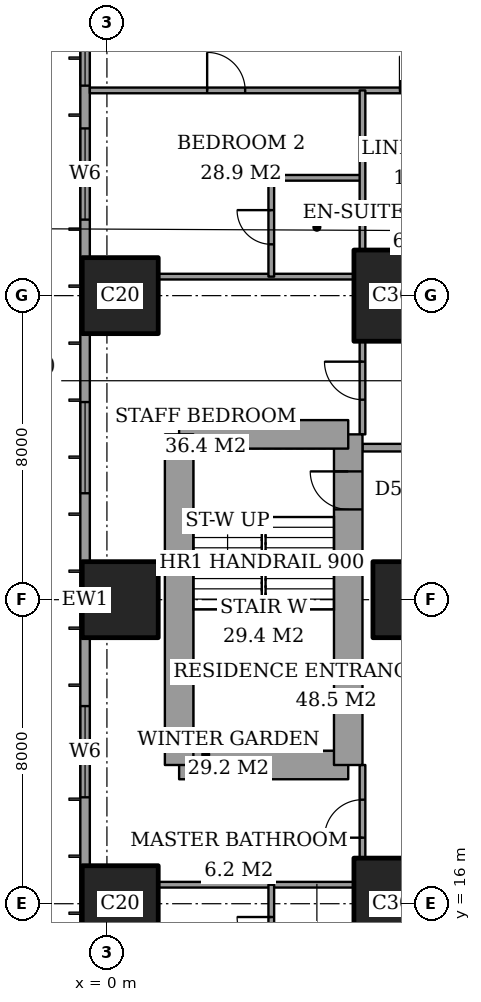
"""IFC4 building model, lengths in metres.
Left out: names, types, materials, properties, quantities, classifications, styles, units other than length and angle.
Written with IfcOpenShell. Run it as: python <this file> out.ifc"""

import sys

from ifc_helpers import new_model, si_unit, direction, frame, frame_2d, origin, origin_2d, place, context, subcontext, project, spatial, rectangle, extrude, element, fill, save


model = new_model("IFC4")
c1 = context("Model", 3, precision=1e-05, world=origin(), true_north=direction((0.0, 1.0)))
c2 = subcontext(c1, "Body", "Model", "MODEL_VIEW")
j1 = project(units=[si_unit("LENGTHUNIT", "METRE"), si_unit("PLANEANGLEUNIT", "RADIAN")], contexts=[c1])
p1 = place(None, origin())
s1 = spatial("IfcSite", under=j1, at=p1, CompositionType="ELEMENT")
p2 = place(p1, origin())
s2 = spatial("IfcBuilding", under=s1, at=p2, CompositionType="ELEMENT")
p3 = place(p2, frame((0.0, 0.0, 47.6)))
s3 = spatial("IfcBuildingStorey", under=s2, at=p3, CompositionType="ELEMENT", Elevation=47.6)
for number, where, z_axis, x_axis in (
    (1, (0.35, 16.0, 0.0), (0.0, 0.0, 1.0), (1.0, 0.0, 0.0)),
    (2, (0.35, 24.0, 0.0), (0.0, 0.0, 1.0), (1.0, 0.0, 0.0)),
    (3, (0.35, 32.0, 0.0), (0.0, 0.0, 1.0), (1.0, 0.0, 0.0)),
):
    element("IfcColumn", number, at=place(p3, frame(where, z_axis=z_axis, x_axis=x_axis)), inside=s3, PredefinedType="COLUMN", context=c2, shape_type="SweptSolid", body=[
        extrude(rectangle(XDim=2.0, YDim=2.0, at=origin_2d()), origin(), (0.0, 0.0, 1.0), 3.6),
    ])
p4 = place(p3, frame((8.0, 16.0, 0.0), z_axis=(0.0, 0.0, 1.0), x_axis=(1.0, 0.0, 0.0)))
e4 = element("IfcColumn", 4, at=p4, inside=s3, PredefinedType="COLUMN", context=c2, shape_type="SweptSolid", body=[
    extrude(rectangle(XDim=3.0, YDim=2.4, at=origin_2d()), origin(), (0.0, 0.0, 1.0), 3.6),
])
p5 = place(p3, frame((8.0, 24.0, 0.0), z_axis=(0.0, 0.0, 1.0), x_axis=(1.0, 0.0, 0.0)))
e5 = element("IfcColumn", 5, at=p5, inside=s3, PredefinedType="COLUMN", context=c2, shape_type="SweptSolid", body=[
    extrude(rectangle(XDim=2.0, YDim=2.0, at=origin_2d()), origin(), (0.0, 0.0, 1.0), 3.6),
])
p6 = place(p3, frame((8.0, 32.0, 0.0), z_axis=(0.0, 0.0, 1.0), x_axis=(1.0, 0.0, 0.0)))
e6 = element("IfcColumn", 6, at=p6, inside=s3, PredefinedType="COLUMN", context=c2, shape_type="SweptSolid", body=[
    extrude(rectangle(XDim=3.0, YDim=2.4, at=origin_2d()), origin(), (0.0, 0.0, 1.0), 3.6),
])
p7 = place(p3, frame((1.9, 19.65, 0.0), z_axis=(0.0, 0.0, 1.0), x_axis=(1.0, 0.0, 0.0)))
e7 = element("IfcWall", 7, at=p7, inside=s3, PredefinedType="SHEAR", context=c2, shape_type="SweptSolid", body=[
    extrude(rectangle(XDim=4.45, YDim=0.75, at=frame_2d((2.225, 0.0))), origin(), (0.0, 0.0, 1.0), 3.6),
])
p8 = place(p3, frame((6.35, 19.65, 0.0), z_axis=(0.0, 0.0, 1.0), x_axis=(0.0, 1.0, 0.0)))
e8 = element("IfcWall", 8, at=p8, inside=s3, PredefinedType="SHEAR", context=c2, shape_type="SweptSolid", body=[
    extrude(rectangle(XDim=8.7, YDim=0.75, at=frame_2d((4.35, 0.0))), origin(), (0.0, 0.0, 1.0), 3.6),
])
p9 = place(p8, frame((6.725, 0.0, 0.0)))
e9 = element("IfcOpeningElement", 9, at=p9, cuts=e8, PredefinedType="OPENING", context=c2, shape_type="SweptSolid", body=[
    extrude(rectangle(XDim=1.0, YDim=2.1, at=frame_2d((0.5, 1.05))), frame((0.0, 0.385, 0.0), z_axis=(0.0, -1.0, 0.0), x_axis=(1.0, 0.0, 0.0)), (0.0, 0.0, 1.0), 0.77),
])
p10 = place(p3, frame((6.35, 28.35, 0.0), z_axis=(0.0, 0.0, 1.0), x_axis=(-1.0, 0.0, 0.0)))
e10 = element("IfcWall", 10, at=p10, inside=s3, PredefinedType="SHEAR", context=c2, shape_type="SweptSolid", body=[
    extrude(rectangle(XDim=4.45, YDim=0.75, at=frame_2d((2.225, 0.0))), origin(), (0.0, 0.0, 1.0), 3.6),
])
p11 = place(p3, frame((1.9, 28.35, 0.0), z_axis=(0.0, 0.0, 1.0), x_axis=(0.0, -1.0, 0.0)))
e11 = element("IfcWall", 11, at=p11, inside=s3, PredefinedType="SHEAR", context=c2, shape_type="SweptSolid", body=[
    extrude(rectangle(XDim=8.7, YDim=0.75, at=frame_2d((4.35, 0.0))), origin(), (0.0, 0.0, 1.0), 3.6),
])
p12 = place(p3, frame((-0.575, 44.825, 0.0), z_axis=(0.0, 0.0, 1.0), x_axis=(0.0, -1.0, 0.0)))
e12 = element("IfcWall", 12, at=p12, inside=s3, PredefinedType="SOLIDWALL", context=c2, shape_type="SweptSolid", body=[
    extrude(rectangle(XDim=41.65, YDim=0.25, at=frame_2d((20.825, 0.0))), origin(), (0.0, 0.0, 1.0), 3.6),
])
p13 = place(p12, frame((0.775, 0.0, 0.6)))
e13 = element("IfcOpeningElement", 13, at=p13, cuts=e12, PredefinedType="OPENING", context=c2, shape_type="SweptSolid", body=[
    extrude(rectangle(XDim=2.4, YDim=2.0, at=frame_2d((1.2, 1.0))), frame((0.0, 0.135, 0.0), z_axis=(0.0, -1.0, 0.0), x_axis=(1.0, 0.0, 0.0)), (0.0, 0.0, 1.0), 0.27),
])
p14 = place(p12, frame((6.1, 0.0, 0.6)))
e14 = element("IfcOpeningElement", 14, at=p14, cuts=e12, PredefinedType="OPENING", context=c2, shape_type="SweptSolid", body=[
    extrude(rectangle(XDim=1.2, YDim=2.0, at=frame_2d((0.6, 1.0))), frame((0.0, 0.135, 0.0), z_axis=(0.0, -1.0, 0.0), x_axis=(1.0, 0.0, 0.0)), (0.0, 0.0, 1.0), 0.27),
])
p15 = place(p12, frame((8.425, 0.0, 0.6)))
e15 = element("IfcOpeningElement", 15, at=p15, cuts=e12, PredefinedType="OPENING", context=c2, shape_type="SweptSolid", body=[
    extrude(rectangle(XDim=2.4, YDim=2.0, at=frame_2d((1.2, 1.0))), frame((0.0, 0.135, 0.0), z_axis=(0.0, -1.0, 0.0), x_axis=(1.0, 0.0, 0.0)), (0.0, 0.0, 1.0), 0.27),
])
p16 = place(p12, frame((15.625, 0.0, 0.6)))
e16 = element("IfcOpeningElement", 16, at=p16, cuts=e12, PredefinedType="OPENING", context=c2, shape_type="SweptSolid", body=[
    extrude(rectangle(XDim=2.4, YDim=2.0, at=frame_2d((1.2, 1.0))), frame((0.0, 0.135, 0.0), z_axis=(0.0, -1.0, 0.0), x_axis=(1.0, 0.0, 0.0)), (0.0, 0.0, 1.0), 0.27),
])
p17 = place(p12, frame((23.625, 0.0, 0.6)))
e17 = element("IfcOpeningElement", 17, at=p17, cuts=e12, PredefinedType="OPENING", context=c2, shape_type="SweptSolid", body=[
    extrude(rectangle(XDim=2.4, YDim=2.0, at=frame_2d((1.2, 1.0))), frame((0.0, 0.135, 0.0), z_axis=(0.0, -1.0, 0.0), x_axis=(1.0, 0.0, 0.0)), (0.0, 0.0, 1.0), 0.27),
])
p18 = place(p12, frame((30.825, 0.0, 0.6)))
e18 = element("IfcOpeningElement", 18, at=p18, cuts=e12, PredefinedType="OPENING", context=c2, shape_type="SweptSolid", body=[
    extrude(rectangle(XDim=2.4, YDim=2.0, at=frame_2d((1.2, 1.0))), frame((0.0, 0.135, 0.0), z_axis=(0.0, -1.0, 0.0), x_axis=(1.0, 0.0, 0.0)), (0.0, 0.0, 1.0), 0.27),
])
p19 = place(p12, frame((34.5, 0.0, 0.6)))
e19 = element("IfcOpeningElement", 19, at=p19, cuts=e12, PredefinedType="OPENING", context=c2, shape_type="SweptSolid", body=[
    extrude(rectangle(XDim=1.2, YDim=2.0, at=frame_2d((0.6, 1.0))), frame((0.0, 0.135, 0.0), z_axis=(0.0, -1.0, 0.0), x_axis=(1.0, 0.0, 0.0)), (0.0, 0.0, 1.0), 0.27),
])
p20 = place(p12, frame((38.475, 0.0, 0.6)))
e20 = element("IfcOpeningElement", 20, at=p20, cuts=e12, PredefinedType="OPENING", context=c2, shape_type="SweptSolid", body=[
    extrude(rectangle(XDim=2.4, YDim=2.0, at=frame_2d((1.2, 1.0))), frame((0.0, 0.135, 0.0), z_axis=(0.0, -1.0, 0.0), x_axis=(1.0, 0.0, 0.0)), (0.0, 0.0, 1.0), 0.27),
])
p21 = place(p3, frame((1.35, 16.5, 0.0), z_axis=(0.0, 0.0, 1.0), x_axis=(1.0, 0.0, 0.0)))
e21 = element("IfcWall", 21, at=p21, inside=s3, PredefinedType="PARTITIONING", context=c2, shape_type="SweptSolid", body=[
    extrude(rectangle(XDim=5.15, YDim=0.15, at=frame_2d((2.575, 0.0))), origin(), (0.0, 0.0, 1.0), 3.35),
])
p22 = place(p3, frame((6.725, 28.0, 0.0), z_axis=(0.0, 0.0, 1.0), x_axis=(1.0, 0.0, 0.0)))
e22 = element("IfcWall", 22, at=p22, inside=s3, PredefinedType="PARTITIONING", context=c2, shape_type="SweptSolid", body=[
    extrude(rectangle(XDim=17.275, YDim=0.2, at=frame_2d((8.637, 0.0))), origin(), (0.0, 0.0, 1.0), 3.35),
])
p23 = place(p22, frame((6.475, 0.0, 0.0)))
e23 = element("IfcOpeningElement", 23, at=p23, cuts=e22, PredefinedType="OPENING", context=c2, shape_type="SweptSolid", body=[
    extrude(rectangle(XDim=1.2, YDim=2.4, at=frame_2d((0.6, 1.2))), frame((0.0, 0.11, 0.0), z_axis=(0.0, -1.0, 0.0), x_axis=(1.0, 0.0, 0.0)), (0.0, 0.0, 1.0), 0.22),
])
p24 = place(p3, frame((1.35, 32.5, 0.0), z_axis=(0.0, 0.0, 1.0), x_axis=(1.0, 0.0, 0.0)))
e24 = element("IfcWall", 24, at=p24, inside=s3, PredefinedType="PARTITIONING", context=c2, shape_type="SweptSolid", body=[
    extrude(rectangle(XDim=5.15, YDim=0.15, at=frame_2d((2.575, 0.0))), origin(), (0.0, 0.0, 1.0), 3.35),
])
p25 = place(p3, frame((4.325, 35.1, 0.0), z_axis=(0.0, 0.0, 1.0), x_axis=(1.0, 0.0, 0.0)))
e25 = element("IfcWall", 25, at=p25, inside=s3, PredefinedType="PARTITIONING", context=c2, shape_type="SweptSolid", body=[
    extrude(rectangle(XDim=2.4, YDim=0.15, at=frame_2d((1.2, 0.0))), origin(), (0.0, 0.0, 1.0), 3.35),
])
p26 = place(p3, frame((-0.45, 37.4, 0.0), z_axis=(0.0, 0.0, 1.0), x_axis=(1.0, 0.0, 0.0)))
e26 = element("IfcWall", 26, at=p26, inside=s3, PredefinedType="PARTITIONING", context=c2, shape_type="SweptSolid", body=[
    extrude(rectangle(XDim=25.011, YDim=0.15, at=frame_2d((12.505, 0.0))), origin(), (0.0, 0.0, 1.0), 3.35),
])
p27 = place(p26, frame((10.65, 0.0, 0.0)))
e27 = element("IfcOpeningElement", 27, at=p27, cuts=e26, PredefinedType="OPENING", context=c2, shape_type="SweptSolid", body=[
    extrude(rectangle(XDim=1.0, YDim=2.1, at=frame_2d((0.5, 1.05))), frame((0.0, 0.085, 0.0), z_axis=(0.0, -1.0, 0.0), x_axis=(1.0, 0.0, 0.0)), (0.0, 0.0, 1.0), 0.17),
])
p28 = place(p26, frame((3.087, 0.0, 0.0)))
e28 = element("IfcOpeningElement", 28, at=p28, cuts=e26, PredefinedType="OPENING", context=c2, shape_type="SweptSolid", body=[
    extrude(rectangle(XDim=1.0, YDim=2.1, at=frame_2d((0.5, 1.05))), frame((0.0, 0.085, 0.0), z_axis=(0.0, -1.0, 0.0), x_axis=(1.0, 0.0, 0.0)), (0.0, 0.0, 1.0), 0.17),
])
p29 = place(p26, frame((8.163, 0.0, 0.0)))
e29 = element("IfcOpeningElement", 29, at=p29, cuts=e26, PredefinedType="OPENING", context=c2, shape_type="SweptSolid", body=[
    extrude(rectangle(XDim=0.9, YDim=2.1, at=frame_2d((0.45, 1.05))), frame((0.0, 0.085, 0.0), z_axis=(0.0, -1.0, 0.0), x_axis=(1.0, 0.0, 0.0)), (0.0, 0.0, 1.0), 0.17),
])
p30 = place(p26, frame((13.35, 0.0, 0.0)))
e30 = element("IfcOpeningElement", 30, at=p30, cuts=e26, PredefinedType="OPENING", context=c2, shape_type="SweptSolid", body=[
    extrude(rectangle(XDim=1.0, YDim=2.1, at=frame_2d((0.5, 1.05))), frame((0.0, 0.085, 0.0), z_axis=(0.0, -1.0, 0.0), x_axis=(1.0, 0.0, 0.0)), (0.0, 0.0, 1.0), 0.17),
])
p31 = place(p26, frame((16.45, 0.0, 0.0)))
e31 = element("IfcOpeningElement", 31, at=p31, cuts=e26, PredefinedType="OPENING", context=c2, shape_type="SweptSolid", body=[
    extrude(rectangle(XDim=1.0, YDim=2.1, at=frame_2d((0.5, 1.05))), frame((0.0, 0.085, 0.0), z_axis=(0.0, -1.0, 0.0), x_axis=(1.0, 0.0, 0.0)), (0.0, 0.0, 1.0), 0.17),
])
p32 = place(p26, frame((21.175, 0.0, 0.0)))
e32 = element("IfcOpeningElement", 32, at=p32, cuts=e26, PredefinedType="OPENING", context=c2, shape_type="SweptSolid", body=[
    extrude(rectangle(XDim=1.0, YDim=2.1, at=frame_2d((0.5, 1.05))), frame((0.0, 0.085, 0.0), z_axis=(0.0, -1.0, 0.0), x_axis=(1.0, 0.0, 0.0)), (0.0, 0.0, 1.0), 0.17),
])
p33 = place(p3, frame((4.325, 13.9, 0.0), z_axis=(0.0, 0.0, 1.0), x_axis=(0.0, 1.0, 0.0)))
e33 = element("IfcWall", 33, at=p33, inside=s3, PredefinedType="PARTITIONING", context=c2, shape_type="SweptSolid", body=[
    extrude(rectangle(XDim=2.6, YDim=0.15, at=frame_2d((1.3, 0.0))), origin(), (0.0, 0.0, 1.0), 3.35),
])
p34 = place(p33, frame((0.85, 0.0, 0.0)))
e34 = element("IfcOpeningElement", 34, at=p34, cuts=e33, PredefinedType="OPENING", context=c2, shape_type="SweptSolid", body=[
    extrude(rectangle(XDim=0.9, YDim=2.1, at=frame_2d((0.45, 1.05))), frame((0.0, 0.085, 0.0), z_axis=(0.0, -1.0, 0.0), x_axis=(1.0, 0.0, 0.0)), (0.0, 0.0, 1.0), 0.17),
])
p35 = place(p3, frame((4.325, 32.5, 0.0), z_axis=(0.0, 0.0, 1.0), x_axis=(0.0, 1.0, 0.0)))
e35 = element("IfcWall", 35, at=p35, inside=s3, PredefinedType="PARTITIONING", context=c2, shape_type="SweptSolid", body=[
    extrude(rectangle(XDim=2.6, YDim=0.15, at=frame_2d((1.3, 0.0))), origin(), (0.0, 0.0, 1.0), 3.35),
])
p36 = place(p35, frame((0.85, 0.0, 0.0)))
e36 = element("IfcOpeningElement", 36, at=p36, cuts=e35, PredefinedType="OPENING", context=c2, shape_type="SweptSolid", body=[
    extrude(rectangle(XDim=0.9, YDim=2.1, at=frame_2d((0.45, 1.05))), frame((0.0, 0.085, 0.0), z_axis=(0.0, -1.0, 0.0), x_axis=(1.0, 0.0, 0.0)), (0.0, 0.0, 1.0), 0.17),
])
p37 = place(p3, frame((6.725, 17.2, 0.0), z_axis=(0.0, 0.0, 1.0), x_axis=(0.0, 1.0, 0.0)))
e37 = element("IfcWall", 37, at=p37, inside=s3, PredefinedType="PARTITIONING", context=c2, shape_type="SweptSolid", body=[
    extrude(rectangle(XDim=2.45, YDim=0.15, at=frame_2d((1.225, 0.0))), origin(), (0.0, 0.0, 1.0), 3.35),
])
p38 = place(p37, frame((0.538, 0.0, 0.0)))
e38 = element("IfcOpeningElement", 38, at=p38, cuts=e37, PredefinedType="OPENING", context=c2, shape_type="SweptSolid", body=[
    extrude(rectangle(XDim=1.0, YDim=2.1, at=frame_2d((0.5, 1.05))), frame((0.0, 0.085, 0.0), z_axis=(0.0, -1.0, 0.0), x_axis=(1.0, 0.0, 0.0)), (0.0, 0.0, 1.0), 0.17),
])
p39 = place(p3, frame((6.725, 28.35, 0.0), z_axis=(0.0, 0.0, 1.0), x_axis=(0.0, 1.0, 0.0)))
e39 = element("IfcWall", 39, at=p39, inside=s3, PredefinedType="PARTITIONING", context=c2, shape_type="SweptSolid", body=[
    extrude(rectangle(XDim=2.45, YDim=0.15, at=frame_2d((1.225, 0.0))), origin(), (0.0, 0.0, 1.0), 3.35),
])
p40 = place(p39, frame((0.913, 0.0, 0.0)))
e40 = element("IfcOpeningElement", 40, at=p40, cuts=e39, PredefinedType="OPENING", context=c2, shape_type="SweptSolid", body=[
    extrude(rectangle(XDim=1.0, YDim=2.1, at=frame_2d((0.5, 1.05))), frame((0.0, 0.085, 0.0), z_axis=(0.0, -1.0, 0.0), x_axis=(1.0, 0.0, 0.0)), (0.0, 0.0, 1.0), 0.17),
])
p41 = place(p3, frame((6.725, 33.2, 0.0), z_axis=(0.0, 0.0, 1.0), x_axis=(0.0, 1.0, 0.0)))
e41 = element("IfcWall", 41, at=p41, inside=s3, PredefinedType="PARTITIONING", context=c2, shape_type="SweptSolid", body=[
    extrude(rectangle(XDim=4.2, YDim=0.15, at=frame_2d((2.1, 0.0))), origin(), (0.0, 0.0, 1.0), 3.35),
])
p42 = place(p14, origin())
e42 = element("IfcWindow", 42, at=p42, inside=s3, PartitioningType="SINGLE_PANEL", PredefinedType="WINDOW", context=c2, shape_type="SweptSolid", body=[
    extrude(rectangle(XDim=1.2, YDim=2.0, at=frame_2d((0.6, 1.0))), frame((0.0, 0.03, 0.0), z_axis=(0.0, -1.0, 0.0), x_axis=(1.0, 0.0, 0.0)), (0.0, 0.0, 1.0), 0.06),
])
fill(e14, e42)
p43 = place(p15, origin())
e43 = element("IfcWindow", 43, at=p43, inside=s3, PartitioningType="SINGLE_PANEL", PredefinedType="WINDOW", context=c2, shape_type="SweptSolid", body=[
    extrude(rectangle(XDim=2.4, YDim=2.0, at=frame_2d((1.2, 1.0))), frame((0.0, 0.03, 0.0), z_axis=(0.0, -1.0, 0.0), x_axis=(1.0, 0.0, 0.0)), (0.0, 0.0, 1.0), 0.06),
])
fill(e15, e43)
p44 = place(p16, origin())
e44 = element("IfcWindow", 44, at=p44, inside=s3, PartitioningType="SINGLE_PANEL", PredefinedType="WINDOW", context=c2, shape_type="SweptSolid", body=[
    extrude(rectangle(XDim=2.4, YDim=2.0, at=frame_2d((1.2, 1.0))), frame((0.0, 0.03, 0.0), z_axis=(0.0, -1.0, 0.0), x_axis=(1.0, 0.0, 0.0)), (0.0, 0.0, 1.0), 0.06),
])
fill(e16, e44)
p45 = place(p17, origin())
e45 = element("IfcWindow", 45, at=p45, inside=s3, PartitioningType="SINGLE_PANEL", PredefinedType="WINDOW", context=c2, shape_type="SweptSolid", body=[
    extrude(rectangle(XDim=2.4, YDim=2.0, at=frame_2d((1.2, 1.0))), frame((0.0, 0.03, 0.0), z_axis=(0.0, -1.0, 0.0), x_axis=(1.0, 0.0, 0.0)), (0.0, 0.0, 1.0), 0.06),
])
fill(e17, e45)
p46 = place(p34, origin())
e46 = element("IfcDoor", 46, at=p46, inside=s3, OperationType="SINGLE_SWING_LEFT", PredefinedType="DOOR", context=c2, shape_type="SweptSolid", body=[
    extrude(rectangle(XDim=0.9, YDim=2.1, at=frame_2d((0.45, 1.05))), frame((0.0, 0.025, 0.0), z_axis=(0.0, -1.0, 0.0), x_axis=(1.0, 0.0, 0.0)), (0.0, 0.0, 1.0), 0.05),
])
fill(e34, e46)
p47 = place(p38, origin())
e47 = element("IfcDoor", 47, at=p47, inside=s3, OperationType="SINGLE_SWING_RIGHT", PredefinedType="DOOR", context=c2, shape_type="SweptSolid", body=[
    extrude(rectangle(XDim=1.0, YDim=2.1, at=frame_2d((0.5, 1.05))), frame((0.0, 0.025, 0.0), z_axis=(0.0, -1.0, 0.0), x_axis=(1.0, 0.0, 0.0)), (0.0, 0.0, 1.0), 0.05),
])
fill(e38, e47)
p48 = place(p36, origin())
e48 = element("IfcDoor", 48, at=p48, inside=s3, OperationType="SINGLE_SWING_LEFT", PredefinedType="DOOR", context=c2, shape_type="SweptSolid", body=[
    extrude(rectangle(XDim=0.9, YDim=2.1, at=frame_2d((0.45, 1.05))), frame((0.0, 0.025, 0.0), z_axis=(0.0, -1.0, 0.0), x_axis=(1.0, 0.0, 0.0)), (0.0, 0.0, 1.0), 0.05),
])
fill(e36, e48)
p49 = place(p28, origin())
e49 = element("IfcDoor", 49, at=p49, inside=s3, OperationType="SINGLE_SWING_RIGHT", PredefinedType="DOOR", context=c2, shape_type="SweptSolid", body=[
    extrude(rectangle(XDim=1.0, YDim=2.1, at=frame_2d((0.5, 1.05))), frame((0.0, 0.025, 0.0), z_axis=(0.0, -1.0, 0.0), x_axis=(1.0, 0.0, 0.0)), (0.0, 0.0, 1.0), 0.05),
])
fill(e28, e49)
p50 = place(p40, origin())
e50 = element("IfcDoor", 50, at=p50, inside=s3, OperationType="SINGLE_SWING_LEFT", PredefinedType="DOOR", context=c2, shape_type="SweptSolid", body=[
    extrude(rectangle(XDim=1.0, YDim=2.1, at=frame_2d((0.5, 1.05))), frame((0.0, 0.025, 0.0), z_axis=(0.0, -1.0, 0.0), x_axis=(1.0, 0.0, 0.0)), (0.0, 0.0, 1.0), 0.05),
])
fill(e40, e50)
p51 = place(p29, origin())
e51 = element("IfcDoor", 51, at=p51, inside=s3, OperationType="SINGLE_SWING_RIGHT", PredefinedType="DOOR", context=c2, shape_type="SweptSolid", body=[
    extrude(rectangle(XDim=0.9, YDim=2.1, at=frame_2d((0.45, 1.05))), frame((0.0, 0.025, 0.0), z_axis=(0.0, -1.0, 0.0), x_axis=(1.0, 0.0, 0.0)), (0.0, 0.0, 1.0), 0.05),
])
fill(e29, e51)
p52 = place(p9, origin())
e52 = element("IfcDoor", 52, at=p52, inside=s3, OperationType="SINGLE_SWING_LEFT", PredefinedType="DOOR", context=c2, shape_type="SweptSolid", body=[
    extrude(rectangle(XDim=1.0, YDim=2.1, at=frame_2d((0.5, 1.05))), frame((0.0, 0.025, 0.0), z_axis=(0.0, -1.0, 0.0), x_axis=(1.0, 0.0, 0.0)), (0.0, 0.0, 1.0), 0.05),
])
fill(e9, e52)
save(model, sys.argv[1])
